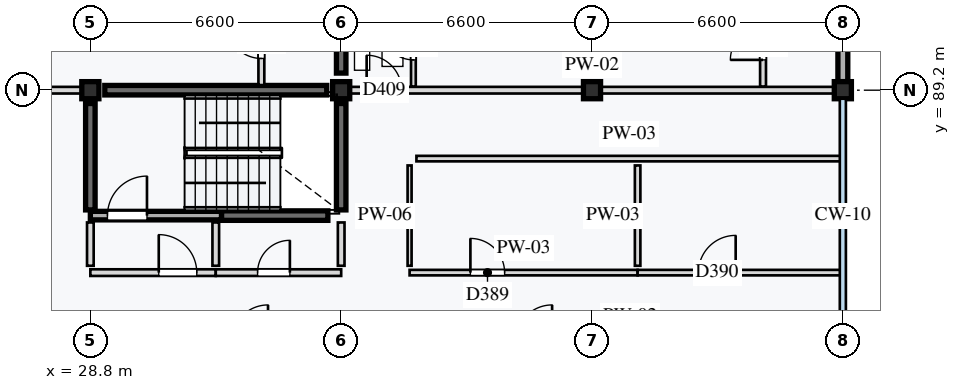
"""IFC4 building model, lengths in metres.
Left out: names, types, materials, properties, quantities, classifications, styles, units other than length and angle.
Written with IfcOpenShell. Run it as: python <this file> out.ifc"""

import sys

from ifc_helpers import new_model, si_unit, direction, frame, frame_2d, origin, origin_2d, place, context, subcontext, project, spatial, rectangle, extrude, element, fill, save


model = new_model("IFC4")
c1 = context("Model", 3, precision=1e-05, world=origin(), true_north=direction((0.0, 1.0)))
c2 = subcontext(c1, "Body", "Model", "MODEL_VIEW")
j1 = project(units=[si_unit("LENGTHUNIT", "METRE"), si_unit("PLANEANGLEUNIT", "RADIAN")], contexts=[c1])
p1 = place(None, origin())
s1 = spatial("IfcSite", under=j1, at=p1, CompositionType="ELEMENT")
p2 = place(p1, origin())
s2 = spatial("IfcBuilding", under=s1, at=p2, CompositionType="ELEMENT")
p3 = place(p2, frame((0.0, 0.0, 40.4)))
s3 = spatial("IfcBuildingStorey", under=s2, at=p3, CompositionType="ELEMENT", Elevation=40.4)
for number, where, z_axis, x_axis in (
    (1, (28.8, 89.2, 0.0), (0.0, 0.0, 1.0), (1.0, 0.0, 0.0)),
    (2, (35.4, 89.2, 0.0), (0.0, 0.0, 1.0), (1.0, 0.0, 0.0)),
    (3, (42.0, 89.2, 0.0), (0.0, 0.0, 1.0), (1.0, 0.0, 0.0)),
    (4, (48.6, 89.2, 0.0), (0.0, 0.0, 1.0), (1.0, 0.0, 0.0)),
):
    element("IfcColumn", number, at=place(p3, frame(where, z_axis=z_axis, x_axis=x_axis)), inside=s3, PredefinedType="COLUMN", context=c2, shape_type="SweptSolid", body=[
        extrude(rectangle(XDim=0.45, YDim=0.45, at=origin_2d()), origin(), (0.0, 0.0, 1.0), 3.2),
    ])
p4 = place(p3, frame((29.18, 89.2, 0.0), z_axis=(0.0, 0.0, 1.0), x_axis=(1.0, 0.0, 0.0)))
e5 = element("IfcWall", 5, at=p4, inside=s3, PredefinedType="SHEAR", context=c2, shape_type="SweptSolid", body=[
    extrude(rectangle(XDim=5.84, YDim=0.25, at=frame_2d((2.92, 0.0))), origin(), (0.0, 0.0, 1.0), 2.98),
])
for number, where, z_axis, x_axis in (
    (6, (32.25, 85.9, 0.0), (0.0, 0.0, 1.0), (1.0, 0.0, 0.0)),
    (7, (28.8, 86.05, 0.0), (0.0, 0.0, 1.0), (0.0, 1.0, 0.0)),
    (8, (35.4, 86.05, 0.0), (0.0, 0.0, 1.0), (0.0, 1.0, 0.0)),
):
    element("IfcWall", number, at=place(p3, frame(where, z_axis=z_axis, x_axis=x_axis)), inside=s3, PredefinedType="SHEAR", context=c2, shape_type="SweptSolid", body=[
        extrude(rectangle(XDim=2.8, YDim=0.25, at=frame_2d((1.4, 0.0))), origin(), (0.0, 0.0, 1.0), 2.98),
    ])
p5 = place(p3, frame((35.4, 89.65, 0.0), z_axis=(0.0, 0.0, 1.0), x_axis=(0.0, 1.0, 0.0)))
e9 = element("IfcWall", 9, at=p5, inside=s3, PredefinedType="SHEAR", context=c2, shape_type="SweptSolid", body=[
    extrude(rectangle(XDim=5.7, YDim=0.25, at=frame_2d((2.85, 0.0))), origin(), (0.0, 0.0, 1.0), 2.98),
])
p6 = place(p3, frame((48.6, 89.425, 0.0), z_axis=(0.0, 0.0, 1.0), x_axis=(0.0, 1.0, 0.0)))
e10 = element("IfcWall", 10, at=p6, inside=s3, PredefinedType="STANDARD", context=c2, shape_type="SweptSolid", body=[
    extrude(rectangle(XDim=4.045, YDim=0.26, at=frame_2d((2.022, 0.0))), origin(), (0.0, 0.0, 1.0), 2.65),
])
p7 = place(p3, frame((28.8, 85.9, 0.0), z_axis=(0.0, 0.0, 1.0), x_axis=(1.0, 0.0, 0.0)))
e11 = element("IfcWall", 11, at=p7, inside=s3, PredefinedType="STANDARD", context=c2, shape_type="SweptSolid", body=[
    extrude(rectangle(XDim=3.45, YDim=0.225, at=frame_2d((1.725, 0.0))), origin(), (0.0, 0.0, 1.0), 2.98),
])
p8 = place(p7, frame((0.45, 0.0, 0.0)))
e12 = element("IfcOpeningElement", 12, at=p8, cuts=e11, PredefinedType="OPENING", context=c2, shape_type="SweptSolid", body=[
    extrude(rectangle(XDim=1.04, YDim=2.12, at=frame_2d((0.52, 1.06))), frame((0.0, 0.123, 0.0), z_axis=(0.0, -1.0, 0.0), x_axis=(1.0, 0.0, 0.0)), (0.0, 0.0, 1.0), 0.245),
])
p9 = place(p3, frame((28.8, 84.4, 0.0), z_axis=(0.0, 0.0, 1.0), x_axis=(1.0, 0.0, 0.0)))
e13 = element("IfcWall", 13, at=p9, inside=s3, PredefinedType="PARTITIONING", context=c2, shape_type="SweptSolid", body=[
    extrude(rectangle(XDim=3.3, YDim=0.175, at=frame_2d((1.65, 0.0))), origin(), (0.0, 0.0, 1.0), 2.98),
])
p10 = place(p9, frame((1.8, 0.0, 0.0)))
e14 = element("IfcOpeningElement", 14, at=p10, cuts=e13, PredefinedType="OPENING", context=c2, shape_type="SweptSolid", body=[
    extrude(rectangle(XDim=1.0, YDim=2.1, at=frame_2d((0.5, 1.05))), frame((0.0, 0.097, 0.0), z_axis=(0.0, -1.0, 0.0), x_axis=(1.0, 0.0, 0.0)), (0.0, 0.0, 1.0), 0.195),
])
p11 = place(p3, frame((32.1, 84.4, 0.0), z_axis=(0.0, 0.0, 1.0), x_axis=(1.0, 0.0, 0.0)))
e15 = element("IfcWall", 15, at=p11, inside=s3, PredefinedType="PARTITIONING", context=c2, shape_type="SweptSolid", body=[
    extrude(rectangle(XDim=3.3, YDim=0.175, at=frame_2d((1.65, 0.0))), origin(), (0.0, 0.0, 1.0), 2.98),
])
p12 = place(p11, frame((1.1, 0.0, 0.0)))
e16 = element("IfcOpeningElement", 16, at=p12, cuts=e15, PredefinedType="OPENING", context=c2, shape_type="SweptSolid", body=[
    extrude(rectangle(XDim=0.85, YDim=2.0, at=frame_2d((0.425, 1.0))), frame((0.0, 0.097, 0.0), z_axis=(0.0, -1.0, 0.0), x_axis=(1.0, 0.0, 0.0)), (0.0, 0.0, 1.0), 0.195),
])
for number, where, z_axis, x_axis in (
    (17, (28.8, 84.58, 0.0), (0.0, 0.0, 1.0), (0.0, 1.0, 0.0)),
    (18, (32.1, 84.58, 0.0), (0.0, 0.0, 1.0), (0.0, 1.0, 0.0)),
    (19, (35.4, 84.58, 0.0), (0.0, 0.0, 1.0), (0.0, 1.0, 0.0)),
):
    element("IfcWall", number, at=place(p3, frame(where, z_axis=z_axis, x_axis=x_axis)), inside=s3, PredefinedType="PARTITIONING", context=c2, shape_type="SweptSolid", body=[
        extrude(rectangle(XDim=1.14, YDim=0.175, at=frame_2d((0.57, 0.0))), origin(), (0.0, 0.0, 1.0), 2.98),
    ])
p13 = place(p3, frame((37.2, 84.4, 0.0), z_axis=(0.0, 0.0, 1.0), x_axis=(1.0, 0.0, 0.0)))
e20 = element("IfcWall", 20, at=p13, inside=s3, PredefinedType="PARTITIONING", context=c2, shape_type="SweptSolid", body=[
    extrude(rectangle(XDim=6.0, YDim=0.145, at=frame_2d((3.0, 0.0))), origin(), (0.0, 0.0, 1.0), 2.98),
])
p14 = place(p13, frame((1.6, 0.0, 0.0)))
e21 = element("IfcOpeningElement", 21, at=p14, cuts=e20, PredefinedType="OPENING", context=c2, shape_type="SweptSolid", body=[
    extrude(rectangle(XDim=0.9, YDim=2.16, at=frame_2d((0.45, 1.08))), frame((0.0, 0.083, 0.0), z_axis=(0.0, -1.0, 0.0), x_axis=(1.0, 0.0, 0.0)), (0.0, 0.0, 1.0), 0.165),
])
p15 = place(p3, frame((43.2, 84.4, 0.0), z_axis=(0.0, 0.0, 1.0), x_axis=(1.0, 0.0, 0.0)))
e22 = element("IfcWall", 22, at=p15, inside=s3, PredefinedType="PARTITIONING", context=c2, shape_type="SweptSolid", body=[
    extrude(rectangle(XDim=5.4, YDim=0.145, at=frame_2d((2.7, 0.0))), origin(), (0.0, 0.0, 1.0), 2.98),
])
p16 = place(p15, frame((1.6, 0.0, 0.0)))
e23 = element("IfcOpeningElement", 23, at=p16, cuts=e22, PredefinedType="OPENING", context=c2, shape_type="SweptSolid", body=[
    extrude(rectangle(XDim=0.98, YDim=2.12, at=frame_2d((0.49, 1.06))), frame((0.0, 0.083, 0.0), z_axis=(0.0, -1.0, 0.0), x_axis=(1.0, 0.0, 0.0)), (0.0, 0.0, 1.0), 0.165),
])
p17 = place(p3, frame((43.2, 84.58, 0.0), z_axis=(0.0, 0.0, 1.0), x_axis=(0.0, 1.0, 0.0)))
e24 = element("IfcWall", 24, at=p17, inside=s3, PredefinedType="PARTITIONING", context=c2, shape_type="SweptSolid", body=[
    extrude(rectangle(XDim=2.64, YDim=0.145, at=frame_2d((1.32, 0.0))), origin(), (0.0, 0.0, 1.0), 2.98),
])
p18 = place(p3, frame((37.38, 87.4, 0.0), z_axis=(0.0, 0.0, 1.0), x_axis=(1.0, 0.0, 0.0)))
e25 = element("IfcWall", 25, at=p18, inside=s3, PredefinedType="PARTITIONING", context=c2, shape_type="SweptSolid", body=[
    extrude(rectangle(XDim=11.2, YDim=0.145, at=frame_2d((5.6, 0.0))), origin(), (0.0, 0.0, 1.0), 2.98),
])
p19 = place(p3, frame((37.2, 84.58, 0.0), z_axis=(0.0, 0.0, 1.0), x_axis=(0.0, 1.0, 0.0)))
e26 = element("IfcWall", 26, at=p19, inside=s3, PredefinedType="PARTITIONING", context=c2, shape_type="SweptSolid", body=[
    extrude(rectangle(XDim=2.64, YDim=0.105, at=frame_2d((1.32, 0.0))), origin(), (0.0, 0.0, 1.0), 2.98),
])
p20 = place(p3, frame((22.2, 89.2, 0.0), z_axis=(0.0, 0.0, 1.0), x_axis=(1.0, 0.0, 0.0)))
e27 = element("IfcWall", 27, at=p20, inside=s3, PredefinedType="PARTITIONING", context=c2, shape_type="SweptSolid", body=[
    extrude(rectangle(XDim=6.6, YDim=0.175, at=frame_2d((3.3, 0.0))), origin(), (0.0, 0.0, 1.0), 2.55),
])
p21 = place(p20, frame((3.85, 0.0, 0.0)))
e28 = element("IfcOpeningElement", 28, at=p21, cuts=e27, PredefinedType="OPENING", context=c2, shape_type="SweptSolid", body=[
    extrude(rectangle(XDim=0.95, YDim=2.16, at=frame_2d((0.475, 1.08))), frame((0.0, 0.097, 0.0), z_axis=(0.0, -1.0, 0.0), x_axis=(1.0, 0.0, 0.0)), (0.0, 0.0, 1.0), 0.195),
])
p22 = place(p3, frame((33.3, 89.335, 0.0), z_axis=(0.0, 0.0, 1.0), x_axis=(0.0, 1.0, 0.0)))
e29 = element("IfcWall", 29, at=p22, inside=s3, PredefinedType="PARTITIONING", context=c2, shape_type="SweptSolid", body=[
    extrude(rectangle(XDim=2.265, YDim=0.155, at=frame_2d((1.133, 0.0))), origin(), (0.0, 0.0, 1.0), 2.98),
])
p23 = place(p22, frame((0.7, 0.0, 0.0)))
e30 = element("IfcOpeningElement", 30, at=p23, cuts=e29, PredefinedType="OPENING", context=c2, shape_type="SweptSolid", body=[
    extrude(rectangle(XDim=0.9, YDim=2.1, at=frame_2d((0.45, 1.05))), frame((0.0, 0.087, 0.0), z_axis=(0.0, -1.0, 0.0), x_axis=(1.0, 0.0, 0.0)), (0.0, 0.0, 1.0), 0.175),
])
p24 = place(p3, frame((35.4, 89.2, 0.0), z_axis=(0.0, 0.0, 1.0), x_axis=(1.0, 0.0, 0.0)))
e31 = element("IfcWall", 31, at=p24, inside=s3, PredefinedType="PARTITIONING", context=c2, shape_type="SweptSolid", body=[
    extrude(rectangle(XDim=13.2, YDim=0.175, at=frame_2d((6.6, 0.0))), origin(), (0.0, 0.0, 1.0), 2.55),
])
p25 = place(p24, frame((0.67, 0.0, 0.0)))
e32 = element("IfcOpeningElement", 32, at=p25, cuts=e31, PredefinedType="OPENING", context=c2, shape_type="SweptSolid", body=[
    extrude(rectangle(XDim=0.92, YDim=2.14, at=frame_2d((0.46, 1.07))), frame((0.0, 0.097, 0.0), z_axis=(0.0, -1.0, 0.0), x_axis=(1.0, 0.0, 0.0)), (0.0, 0.0, 1.0), 0.195),
])
p26 = place(p3, frame((37.3, 89.298, 0.0), z_axis=(0.0, 0.0, 1.0), x_axis=(0.0, 1.0, 0.0)))
e33 = element("IfcWall", 33, at=p26, inside=s3, PredefinedType="PARTITIONING", context=c2, shape_type="SweptSolid", body=[
    extrude(rectangle(XDim=2.302, YDim=0.125, at=frame_2d((1.151, 0.0))), origin(), (0.0, 0.0, 1.0), 2.98),
])
p27 = place(p26, frame((0.7, 0.0, 0.0)))
e34 = element("IfcOpeningElement", 34, at=p27, cuts=e33, PredefinedType="OPENING", context=c2, shape_type="SweptSolid", body=[
    extrude(rectangle(XDim=0.82, YDim=2.05, at=frame_2d((0.41, 1.025))), frame((0.0, 0.073, 0.0), z_axis=(0.0, -1.0, 0.0), x_axis=(1.0, 0.0, 0.0)), (0.0, 0.0, 1.0), 0.145),
])
p28 = place(p3, frame((46.5, 89.298, 0.0), z_axis=(0.0, 0.0, 1.0), x_axis=(0.0, 1.0, 0.0)))
e35 = element("IfcWall", 35, at=p28, inside=s3, PredefinedType="PARTITIONING", context=c2, shape_type="SweptSolid", body=[
    extrude(rectangle(XDim=2.302, YDim=0.155, at=frame_2d((1.151, 0.0))), origin(), (0.0, 0.0, 1.0), 2.98),
])
p29 = place(p28, frame((0.7, 0.0, 0.0)))
e36 = element("IfcOpeningElement", 36, at=p29, cuts=e35, PredefinedType="OPENING", context=c2, shape_type="SweptSolid", body=[
    extrude(rectangle(XDim=0.86, YDim=2.12, at=frame_2d((0.43, 1.06))), frame((0.0, 0.087, 0.0), z_axis=(0.0, -1.0, 0.0), x_axis=(1.0, 0.0, 0.0)), (0.0, 0.0, 1.0), 0.175),
])
p30 = place(p8, origin())
e37 = element("IfcDoor", 37, at=p30, inside=s3, OperationType="SINGLE_SWING_RIGHT", PredefinedType="DOOR", context=c2, shape_type="SweptSolid", body=[
    extrude(rectangle(XDim=1.04, YDim=2.12, at=frame_2d((0.52, 1.06))), frame((0.0, 0.025, 0.0), z_axis=(0.0, -1.0, 0.0), x_axis=(1.0, 0.0, 0.0)), (0.0, 0.0, 1.0), 0.05),
])
fill(e12, e37)
p31 = place(p10, origin())
e38 = element("IfcDoor", 38, at=p31, inside=s3, OperationType="SINGLE_SWING_LEFT", PredefinedType="DOOR", context=c2, shape_type="SweptSolid", body=[
    extrude(rectangle(XDim=1.0, YDim=2.1, at=frame_2d((0.5, 1.05))), frame((0.0, 0.025, 0.0), z_axis=(0.0, -1.0, 0.0), x_axis=(1.0, 0.0, 0.0)), (0.0, 0.0, 1.0), 0.05),
])
fill(e14, e38)
p32 = place(p12, origin())
e39 = element("IfcDoor", 39, at=p32, inside=s3, OperationType="SINGLE_SWING_RIGHT", PredefinedType="DOOR", context=c2, shape_type="SweptSolid", body=[
    extrude(rectangle(XDim=0.85, YDim=2.0, at=frame_2d((0.425, 1.0))), frame((0.0, 0.025, 0.0), z_axis=(0.0, -1.0, 0.0), x_axis=(1.0, 0.0, 0.0)), (0.0, 0.0, 1.0), 0.05),
])
fill(e16, e39)
p33 = place(p14, origin())
e40 = element("IfcDoor", 40, at=p33, inside=s3, OperationType="SINGLE_SWING_LEFT", PredefinedType="DOOR", context=c2, shape_type="SweptSolid", body=[
    extrude(rectangle(XDim=0.9, YDim=2.16, at=frame_2d((0.45, 1.08))), frame((0.0, 0.025, 0.0), z_axis=(0.0, -1.0, 0.0), x_axis=(1.0, 0.0, 0.0)), (0.0, 0.0, 1.0), 0.05),
])
fill(e21, e40)
p34 = place(p16, origin())
e41 = element("IfcDoor", 41, at=p34, inside=s3, OperationType="SINGLE_SWING_RIGHT", PredefinedType="DOOR", context=c2, shape_type="SweptSolid", body=[
    extrude(rectangle(XDim=0.98, YDim=2.12, at=frame_2d((0.49, 1.06))), frame((0.0, 0.025, 0.0), z_axis=(0.0, -1.0, 0.0), x_axis=(1.0, 0.0, 0.0)), (0.0, 0.0, 1.0), 0.05),
])
fill(e23, e41)
p35 = place(p23, origin())
e42 = element("IfcDoor", 42, at=p35, inside=s3, OperationType="SINGLE_SWING_RIGHT", PredefinedType="DOOR", context=c2, shape_type="SweptSolid", body=[
    extrude(rectangle(XDim=0.9, YDim=2.1, at=frame_2d((0.45, 1.05))), frame((0.0, 0.025, 0.0), z_axis=(0.0, -1.0, 0.0), x_axis=(1.0, 0.0, 0.0)), (0.0, 0.0, 1.0), 0.05),
])
fill(e30, e42)
p36 = place(p25, origin())
e43 = element("IfcDoor", 43, at=p36, inside=s3, OperationType="SINGLE_SWING_LEFT", PredefinedType="DOOR", context=c2, shape_type="SweptSolid", body=[
    extrude(rectangle(XDim=0.92, YDim=2.14, at=frame_2d((0.46, 1.07))), frame((0.0, 0.025, 0.0), z_axis=(0.0, -1.0, 0.0), x_axis=(1.0, 0.0, 0.0)), (0.0, 0.0, 1.0), 0.05),
])
fill(e32, e43)
p37 = place(p27, origin())
e44 = element("IfcDoor", 44, at=p37, inside=s3, OperationType="SINGLE_SWING_RIGHT", PredefinedType="DOOR", context=c2, shape_type="SweptSolid", body=[
    extrude(rectangle(XDim=0.82, YDim=2.05, at=frame_2d((0.41, 1.025))), frame((0.0, 0.025, 0.0), z_axis=(0.0, -1.0, 0.0), x_axis=(1.0, 0.0, 0.0)), (0.0, 0.0, 1.0), 0.05),
])
fill(e34, e44)
p38 = place(p29, origin())
e45 = element("IfcDoor", 45, at=p38, inside=s3, OperationType="SINGLE_SWING_LEFT", PredefinedType="DOOR", context=c2, shape_type="SweptSolid", body=[
    extrude(rectangle(XDim=0.86, YDim=2.12, at=frame_2d((0.43, 1.06))), frame((0.0, 0.025, 0.0), z_axis=(0.0, -1.0, 0.0), x_axis=(1.0, 0.0, 0.0)), (0.0, 0.0, 1.0), 0.05),
])
fill(e36, e45)
save(model, sys.argv[1])
